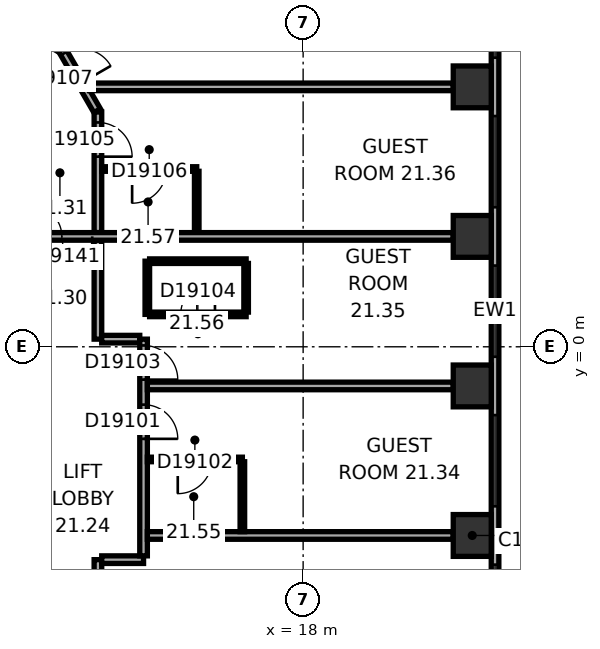
"""IFC4 building model, lengths in metres.
Left out: names, types, materials, properties, quantities, classifications, styles, units other than length and angle.
Written with IfcOpenShell. Run it as: python <this file> out.ifc"""

import sys

from ifc_helpers import new_model, si_unit, direction, frame, frame_2d, origin, origin_2d, place, context, subcontext, project, spatial, rectangle, extrude, element, fill, save


model = new_model("IFC4")
c1 = context("Model", 3, precision=1e-05, world=origin(), true_north=direction((0.0, 1.0)))
c2 = subcontext(c1, "Body", "Model", "MODEL_VIEW")
j1 = project(units=[si_unit("LENGTHUNIT", "METRE"), si_unit("PLANEANGLEUNIT", "RADIAN")], contexts=[c1])
p1 = place(None, origin())
s1 = spatial("IfcSite", under=j1, at=p1, CompositionType="ELEMENT")
p2 = place(p1, origin())
s2 = spatial("IfcBuilding", under=s1, at=p2, CompositionType="ELEMENT")
p3 = place(p2, frame((0.0, 0.0, 93.5)))
s3 = spatial("IfcBuildingStorey", under=s2, at=p3, CompositionType="ELEMENT", Elevation=93.5)
for number, where, z_axis, x_axis in (
    (1, (22.45, -4.965, 0.0), (0.0, 0.0, 1.0), (0.0, 1.0, 0.0)),
    (2, (22.45, -1.03, 0.0), (0.0, 0.0, 1.0), (0.0, 1.0, 0.0)),
    (3, (22.45, 2.905, 0.0), (0.0, 0.0, 1.0), (0.0, 1.0, 0.0)),
    (4, (22.45, 6.839, 0.0), (0.0, 0.0, 1.0), (0.0, 1.0, 0.0)),
):
    element("IfcColumn", number, at=place(p3, frame(where, z_axis=z_axis, x_axis=x_axis)), inside=s3, PredefinedType="COLUMN", context=c2, shape_type="SweptSolid", body=[
        extrude(rectangle(XDim=1.1, YDim=1.0, at=origin_2d()), origin(), (0.0, 0.0, 1.0), 3.3),
    ])
p4 = place(p3, frame((23.05, -9.687, 0.0), z_axis=(0.0, 0.0, 1.0), x_axis=(0.0, 1.0, 0.0)))
e5 = element("IfcWall", 5, at=p4, inside=s3, PredefinedType="STANDARD", context=c2, shape_type="SweptSolid", body=[
    extrude(rectangle(XDim=21.246, YDim=0.2, at=frame_2d((10.623, 0.0))), origin(), (0.0, 0.0, 1.0), 3.3),
])
p5 = place(p4, frame((1.555, 0.0, 0.8)))
e6 = element("IfcOpeningElement", 6, at=p5, cuts=e5, PredefinedType="OPENING", context=c2, shape_type="SweptSolid", body=[
    extrude(rectangle(XDim=2.4, YDim=1.7, at=frame_2d((1.2, 0.85))), frame((0.0, 0.11, 0.0), z_axis=(0.0, -1.0, 0.0), x_axis=(1.0, 0.0, 0.0)), (0.0, 0.0, 1.0), 0.22),
])
p6 = place(p4, frame((5.489, 0.0, 0.8)))
e7 = element("IfcOpeningElement", 7, at=p6, cuts=e5, PredefinedType="OPENING", context=c2, shape_type="SweptSolid", body=[
    extrude(rectangle(XDim=2.4, YDim=1.7, at=frame_2d((1.2, 0.85))), frame((0.0, 0.11, 0.0), z_axis=(0.0, -1.0, 0.0), x_axis=(1.0, 0.0, 0.0)), (0.0, 0.0, 1.0), 0.22),
])
p7 = place(p4, frame((9.424, 0.0, 0.8)))
e8 = element("IfcOpeningElement", 8, at=p7, cuts=e5, PredefinedType="OPENING", context=c2, shape_type="SweptSolid", body=[
    extrude(rectangle(XDim=2.4, YDim=1.7, at=frame_2d((1.2, 0.85))), frame((0.0, 0.11, 0.0), z_axis=(0.0, -1.0, 0.0), x_axis=(1.0, 0.0, 0.0)), (0.0, 0.0, 1.0), 0.22),
])
p8 = place(p4, frame((13.358, 0.0, 0.8)))
e9 = element("IfcOpeningElement", 9, at=p8, cuts=e5, PredefinedType="OPENING", context=c2, shape_type="SweptSolid", body=[
    extrude(rectangle(XDim=2.4, YDim=1.7, at=frame_2d((1.2, 0.85))), frame((0.0, 0.11, 0.0), z_axis=(0.0, -1.0, 0.0), x_axis=(1.0, 0.0, 0.0)), (0.0, 0.0, 1.0), 0.22),
])
p9 = place(p4, frame((17.293, 0.0, 0.8)))
e10 = element("IfcOpeningElement", 10, at=p9, cuts=e5, PredefinedType="OPENING", context=c2, shape_type="SweptSolid", body=[
    extrude(rectangle(XDim=2.4, YDim=1.7, at=frame_2d((1.2, 0.85))), frame((0.0, 0.11, 0.0), z_axis=(0.0, -1.0, 0.0), x_axis=(1.0, 0.0, 0.0)), (0.0, 0.0, 1.0), 0.22),
])
p10 = place(p3, frame((12.58, 6.212, 0.0), z_axis=(0.0, 0.0, 1.0), x_axis=(-0.500063286585, 0.865988862174, 0.0)))
e11 = element("IfcWall", 11, at=p10, inside=s3, PredefinedType="PARTITIONING", context=c2, shape_type="SweptSolid", body=[
    extrude(rectangle(XDim=1.86, YDim=0.2, at=frame_2d((0.93, 0.0))), origin(), (0.0, 0.0, 1.0), 3.05),
])
p11 = place(p10, frame((0.842, 0.0, 0.0)))
e12 = element("IfcOpeningElement", 12, at=p11, cuts=e11, PredefinedType="OPENING", context=c2, shape_type="SweptSolid", body=[
    extrude(rectangle(XDim=0.9, YDim=2.1, at=frame_2d((0.45, 1.05))), frame((0.0, 0.11, 0.0), z_axis=(0.0, -1.0, 0.0), x_axis=(1.0, 0.0, 0.0)), (0.0, 0.0, 1.0), 0.22),
])
p12 = place(p3, frame((12.6, -6.138, 0.0), z_axis=(0.0, 0.0, 1.0), x_axis=(0.0, 1.0, 0.0)))
e13 = element("IfcWall", 13, at=p12, inside=s3, PredefinedType="PARTITIONING", context=c2, shape_type="SweptSolid", body=[
    extrude(rectangle(XDim=0.537, YDim=0.2, at=frame_2d((0.268, 0.0))), origin(), (0.0, 0.0, 1.0), 3.05),
])
p13 = place(p3, frame((12.6, 0.201, 0.0), z_axis=(0.0, 0.0, 1.0), x_axis=(0.0, 1.0, 0.0)))
e14 = element("IfcWall", 14, at=p13, inside=s3, PredefinedType="PARTITIONING", context=c2, shape_type="SweptSolid", body=[
    extrude(rectangle(XDim=2.604, YDim=0.2, at=frame_2d((1.302, 0.0))), origin(), (0.0, 0.0, 1.0), 3.05),
])
p14 = place(p3, frame((12.6, 3.004, 0.0), z_axis=(0.0, 0.0, 1.0), x_axis=(0.0, 1.0, 0.0)))
e15 = element("IfcWall", 15, at=p14, inside=s3, PredefinedType="PARTITIONING", context=c2, shape_type="SweptSolid", body=[
    extrude(rectangle(XDim=3.173, YDim=0.2, at=frame_2d((1.586, 0.0))), origin(), (0.0, 0.0, 1.0), 3.05),
])
p15 = place(p14, frame((1.998, 0.0, 0.0)))
e16 = element("IfcOpeningElement", 16, at=p15, cuts=e15, PredefinedType="OPENING", context=c2, shape_type="SweptSolid", body=[
    extrude(rectangle(XDim=0.9, YDim=2.1, at=frame_2d((0.45, 1.05))), frame((0.0, 0.11, 0.0), z_axis=(0.0, -1.0, 0.0), x_axis=(1.0, 0.0, 0.0)), (0.0, 0.0, 1.0), 0.22),
])
p16 = place(p3, frame((12.7, -5.601, 0.0), z_axis=(0.0, 0.0, 1.0), x_axis=(1.0, 0.0, 0.0)))
e17 = element("IfcWall", 17, at=p16, inside=s3, PredefinedType="PARTITIONING", context=c2, shape_type="SweptSolid", body=[
    extrude(rectangle(XDim=1.101, YDim=0.2, at=frame_2d((0.551, 0.0))), origin(), (0.0, 0.0, 1.0), 3.05),
])
p17 = place(p3, frame((12.7, 4.677, 0.0), z_axis=(0.0, 0.0, 1.0), x_axis=(1.0, 0.0, 0.0)))
e18 = element("IfcWall", 18, at=p17, inside=s3, PredefinedType="PARTITIONING", context=c2, shape_type="SweptSolid", body=[
    extrude(rectangle(XDim=2.5, YDim=0.12, at=frame_2d((1.25, 0.0))), origin(), (0.0, 0.0, 1.0), 3.05),
])
p18 = place(p17, frame((0.8, 0.0, 0.0)))
e19 = element("IfcOpeningElement", 19, at=p18, cuts=e18, PredefinedType="OPENING", context=c2, shape_type="SweptSolid", body=[
    extrude(rectangle(XDim=0.9, YDim=2.1, at=frame_2d((0.45, 1.05))), frame((0.0, 0.07, 0.0), z_axis=(0.0, -1.0, 0.0), x_axis=(1.0, 0.0, 0.0)), (0.0, 0.0, 1.0), 0.14),
])
p19 = place(p3, frame((13.701, 0.201, 0.0), z_axis=(0.0, 0.0, 1.0), x_axis=(-1.0, 0.0, 0.0)))
e20 = element("IfcWall", 20, at=p19, inside=s3, PredefinedType="PARTITIONING", context=c2, shape_type="SweptSolid", body=[
    extrude(rectangle(XDim=1.001, YDim=0.2, at=frame_2d((0.5, 0.0))), origin(), (0.0, 0.0, 1.0), 3.05),
])
p20 = place(p3, frame((13.801, -5.501, 0.0), z_axis=(0.0, 0.0, 1.0), x_axis=(0.0, 1.0, 0.0)))
e21 = element("IfcWall", 21, at=p20, inside=s3, PredefinedType="PARTITIONING", context=c2, shape_type="SweptSolid", body=[
    extrude(rectangle(XDim=5.702, YDim=0.2, at=frame_2d((2.851, 0.0))), origin(), (0.0, 0.0, 1.0), 3.05),
])
p21 = place(p20, frame((3.079, 0.0, 0.0)))
e22 = element("IfcOpeningElement", 22, at=p21, cuts=e21, PredefinedType="OPENING", context=c2, shape_type="SweptSolid", body=[
    extrude(rectangle(XDim=0.9, YDim=2.1, at=frame_2d((0.45, 1.05))), frame((0.0, 0.11, 0.0), z_axis=(0.0, -1.0, 0.0), x_axis=(1.0, 0.0, 0.0)), (0.0, 0.0, 1.0), 0.22),
])
p22 = place(p20, frame((4.636, 0.0, 0.0)))
e23 = element("IfcOpeningElement", 23, at=p22, cuts=e21, PredefinedType="OPENING", context=c2, shape_type="SweptSolid", body=[
    extrude(rectangle(XDim=0.9, YDim=2.1, at=frame_2d((0.45, 1.05))), frame((0.0, 0.11, 0.0), z_axis=(0.0, -1.0, 0.0), x_axis=(1.0, 0.0, 0.0)), (0.0, 0.0, 1.0), 0.22),
])
p23 = place(p3, frame((13.901, -4.965, 0.0), z_axis=(0.0, 0.0, 1.0), x_axis=(1.0, 0.0, 0.0)))
e24 = element("IfcWall", 24, at=p23, inside=s3, PredefinedType="PARTITIONING", context=c2, shape_type="SweptSolid", body=[
    extrude(rectangle(XDim=8.049, YDim=0.2, at=frame_2d((4.024, 0.0))), origin(), (0.0, 0.0, 1.0), 3.05),
])
p24 = place(p3, frame((13.901, -2.965, 0.0), z_axis=(0.0, 0.0, 1.0), x_axis=(1.0, 0.0, 0.0)))
e25 = element("IfcWall", 25, at=p24, inside=s3, PredefinedType="PARTITIONING", context=c2, shape_type="SweptSolid", body=[
    extrude(rectangle(XDim=2.5, YDim=0.12, at=frame_2d((1.25, 0.0))), origin(), (0.0, 0.0, 1.0), 3.05),
])
p25 = place(p24, frame((0.8, 0.0, 0.0)))
e26 = element("IfcOpeningElement", 26, at=p25, cuts=e25, PredefinedType="OPENING", context=c2, shape_type="SweptSolid", body=[
    extrude(rectangle(XDim=0.9, YDim=2.1, at=frame_2d((0.45, 1.05))), frame((0.0, 0.07, 0.0), z_axis=(0.0, -1.0, 0.0), x_axis=(1.0, 0.0, 0.0)), (0.0, 0.0, 1.0), 0.14),
])
p26 = place(p3, frame((13.9, 0.853, 0.0), z_axis=(0.0, 0.0, 1.0), x_axis=(0.0, 1.0, 0.0)))
e27 = element("IfcWall", 27, at=p26, inside=s3, PredefinedType="PARTITIONING", context=c2, shape_type="SweptSolid", body=[
    extrude(rectangle(XDim=1.4, YDim=0.12, at=frame_2d((0.7, 0.0))), origin(), (0.0, 0.0, 1.0), 3.05),
])
p27 = place(p3, frame((13.96, 2.253, 0.0), z_axis=(0.0, 0.0, 1.0), x_axis=(1.0, 0.0, 0.0)))
e28 = element("IfcWall", 28, at=p27, inside=s3, PredefinedType="PARTITIONING", context=c2, shape_type="SweptSolid", body=[
    extrude(rectangle(XDim=2.54, YDim=0.12, at=frame_2d((1.27, 0.0))), origin(), (0.0, 0.0, 1.0), 3.05),
])
p28 = place(p3, frame((15.2, 4.618, 0.0), z_axis=(0.0, 0.0, 1.0), x_axis=(0.0, -1.0, 0.0)))
e29 = element("IfcWall", 29, at=p28, inside=s3, PredefinedType="PARTITIONING", context=c2, shape_type="SweptSolid", body=[
    extrude(rectangle(XDim=1.613, YDim=0.12, at=frame_2d((0.807, 0.0))), origin(), (0.0, 0.0, 1.0), 3.05),
])
p29 = place(p3, frame((16.401, -3.025, 0.0), z_axis=(0.0, 0.0, 1.0), x_axis=(0.0, -1.0, 0.0)))
e30 = element("IfcWall", 30, at=p29, inside=s3, PredefinedType="PARTITIONING", context=c2, shape_type="SweptSolid", body=[
    extrude(rectangle(XDim=1.84, YDim=0.12, at=frame_2d((0.92, 0.0))), origin(), (0.0, 0.0, 1.0), 3.05),
])
p30 = place(p3, frame((16.5, 0.853, 0.0), z_axis=(0.0, 0.0, 1.0), x_axis=(-1.0, 0.0, 0.0)))
e31 = element("IfcWall", 31, at=p30, inside=s3, PredefinedType="PARTITIONING", context=c2, shape_type="SweptSolid", body=[
    extrude(rectangle(XDim=2.54, YDim=0.12, at=frame_2d((1.27, 0.0))), origin(), (0.0, 0.0, 1.0), 3.05),
])
p31 = place(p30, frame((0.82, 0.0, 0.0)))
e32 = element("IfcOpeningElement", 32, at=p31, cuts=e31, PredefinedType="OPENING", context=c2, shape_type="SweptSolid", body=[
    extrude(rectangle(XDim=0.9, YDim=2.1, at=frame_2d((0.45, 1.05))), frame((0.0, 0.07, 0.0), z_axis=(0.0, -1.0, 0.0), x_axis=(1.0, 0.0, 0.0)), (0.0, 0.0, 1.0), 0.14),
])
p32 = place(p3, frame((16.5, 2.193, 0.0), z_axis=(0.0, 0.0, 1.0), x_axis=(0.0, -1.0, 0.0)))
e33 = element("IfcWall", 33, at=p32, inside=s3, PredefinedType="PARTITIONING", context=c2, shape_type="SweptSolid", body=[
    extrude(rectangle(XDim=1.28, YDim=0.12, at=frame_2d((0.64, 0.0))), origin(), (0.0, 0.0, 1.0), 3.05),
])
p33 = place(p3, frame((21.95, -1.03, 0.0), z_axis=(0.0, 0.0, 1.0), x_axis=(-1.0, 0.0, 0.0)))
e34 = element("IfcWall", 34, at=p33, inside=s3, PredefinedType="PARTITIONING", context=c2, shape_type="SweptSolid", body=[
    extrude(rectangle(XDim=8.049, YDim=0.2, at=frame_2d((4.024, 0.0))), origin(), (0.0, 0.0, 1.0), 2.6),
])
p34 = place(p3, frame((21.95, 2.905, 0.0), z_axis=(0.0, 0.0, 1.0), x_axis=(-1.0, 0.0, 0.0)))
e35 = element("IfcWall", 35, at=p34, inside=s3, PredefinedType="PARTITIONING", context=c2, shape_type="SweptSolid", body=[
    extrude(rectangle(XDim=11.25, YDim=0.2, at=frame_2d((5.625, 0.0))), origin(), (0.0, 0.0, 1.0), 3.05),
])
p35 = place(p34, frame((9.5, 0.0, 0.0)))
e36 = element("IfcOpeningElement", 36, at=p35, cuts=e35, PredefinedType="OPENING", context=c2, shape_type="SweptSolid", body=[
    extrude(rectangle(XDim=1.6, YDim=2.1, at=frame_2d((0.8, 1.05))), frame((0.0, 0.11, 0.0), z_axis=(0.0, -1.0, 0.0), x_axis=(1.0, 0.0, 0.0)), (0.0, 0.0, 1.0), 0.22),
])
p36 = place(p3, frame((21.95, 6.839, 0.0), z_axis=(0.0, 0.0, 1.0), x_axis=(-1.0, 0.0, 0.0)))
e37 = element("IfcWall", 37, at=p36, inside=s3, PredefinedType="PARTITIONING", context=c2, shape_type="SweptSolid", body=[
    extrude(rectangle(XDim=9.572, YDim=0.2, at=frame_2d((4.786, 0.0))), origin(), (0.0, 0.0, 1.0), 3.05),
])
p37 = place(p5, origin())
e38 = element("IfcWindow", 38, at=p37, inside=s3, PartitioningType="SINGLE_PANEL", PredefinedType="WINDOW", context=c2, shape_type="SweptSolid", body=[
    extrude(rectangle(XDim=2.4, YDim=1.7, at=frame_2d((1.2, 0.85))), frame((0.0, 0.03, 0.0), z_axis=(0.0, -1.0, 0.0), x_axis=(1.0, 0.0, 0.0)), (0.0, 0.0, 1.0), 0.06),
])
fill(e6, e38)
p38 = place(p6, origin())
e39 = element("IfcWindow", 39, at=p38, inside=s3, PartitioningType="SINGLE_PANEL", PredefinedType="WINDOW", context=c2, shape_type="SweptSolid", body=[
    extrude(rectangle(XDim=2.4, YDim=1.7, at=frame_2d((1.2, 0.85))), frame((0.0, 0.03, 0.0), z_axis=(0.0, -1.0, 0.0), x_axis=(1.0, 0.0, 0.0)), (0.0, 0.0, 1.0), 0.06),
])
fill(e7, e39)
p39 = place(p7, origin())
e40 = element("IfcWindow", 40, at=p39, inside=s3, PartitioningType="SINGLE_PANEL", PredefinedType="WINDOW", context=c2, shape_type="SweptSolid", body=[
    extrude(rectangle(XDim=2.4, YDim=1.7, at=frame_2d((1.2, 0.85))), frame((0.0, 0.03, 0.0), z_axis=(0.0, -1.0, 0.0), x_axis=(1.0, 0.0, 0.0)), (0.0, 0.0, 1.0), 0.06),
])
fill(e8, e40)
p40 = place(p8, origin())
e41 = element("IfcWindow", 41, at=p40, inside=s3, PartitioningType="SINGLE_PANEL", PredefinedType="WINDOW", context=c2, shape_type="SweptSolid", body=[
    extrude(rectangle(XDim=2.4, YDim=1.7, at=frame_2d((1.2, 0.85))), frame((0.0, 0.03, 0.0), z_axis=(0.0, -1.0, 0.0), x_axis=(1.0, 0.0, 0.0)), (0.0, 0.0, 1.0), 0.06),
])
fill(e9, e41)
p41 = place(p9, origin())
e42 = element("IfcWindow", 42, at=p41, inside=s3, PartitioningType="SINGLE_PANEL", PredefinedType="WINDOW", context=c2, shape_type="SweptSolid", body=[
    extrude(rectangle(XDim=2.4, YDim=1.7, at=frame_2d((1.2, 0.85))), frame((0.0, 0.03, 0.0), z_axis=(0.0, -1.0, 0.0), x_axis=(1.0, 0.0, 0.0)), (0.0, 0.0, 1.0), 0.06),
])
fill(e10, e42)
p42 = place(p21, origin())
e43 = element("IfcDoor", 43, at=p42, inside=s3, OperationType="SINGLE_SWING_LEFT", PredefinedType="DOOR", context=c2, shape_type="SweptSolid", body=[
    extrude(rectangle(XDim=0.9, YDim=2.1, at=frame_2d((0.45, 1.05))), frame((0.0, 0.025, 0.0), z_axis=(0.0, -1.0, 0.0), x_axis=(1.0, 0.0, 0.0)), (0.0, 0.0, 1.0), 0.05),
])
fill(e22, e43)
p43 = place(p25, origin())
e44 = element("IfcDoor", 44, at=p43, inside=s3, OperationType="SINGLE_SWING_LEFT", PredefinedType="DOOR", context=c2, shape_type="SweptSolid", body=[
    extrude(rectangle(XDim=0.9, YDim=2.1, at=frame_2d((0.45, 1.05))), frame((0.0, 0.025, 0.0), z_axis=(0.0, -1.0, 0.0), x_axis=(1.0, 0.0, 0.0)), (0.0, 0.0, 1.0), 0.05),
])
fill(e26, e44)
p44 = place(p22, origin())
e45 = element("IfcDoor", 45, at=p44, inside=s3, OperationType="SINGLE_SWING_LEFT", PredefinedType="DOOR", context=c2, shape_type="SweptSolid", body=[
    extrude(rectangle(XDim=0.9, YDim=2.1, at=frame_2d((0.45, 1.05))), frame((0.0, 0.025, 0.0), z_axis=(0.0, -1.0, 0.0), x_axis=(1.0, 0.0, 0.0)), (0.0, 0.0, 1.0), 0.05),
])
fill(e23, e45)
p45 = place(p31, origin())
e46 = element("IfcDoor", 46, at=p45, inside=s3, OperationType="SINGLE_SWING_LEFT", PredefinedType="DOOR", context=c2, shape_type="SweptSolid", body=[
    extrude(rectangle(XDim=0.9, YDim=2.1, at=frame_2d((0.45, 1.05))), frame((0.0, 0.025, 0.0), z_axis=(0.0, -1.0, 0.0), x_axis=(1.0, 0.0, 0.0)), (0.0, 0.0, 1.0), 0.05),
])
fill(e32, e46)
p46 = place(p15, origin())
e47 = element("IfcDoor", 47, at=p46, inside=s3, OperationType="SINGLE_SWING_LEFT", PredefinedType="DOOR", context=c2, shape_type="SweptSolid", body=[
    extrude(rectangle(XDim=0.9, YDim=2.1, at=frame_2d((0.45, 1.05))), frame((0.0, 0.025, 0.0), z_axis=(0.0, -1.0, 0.0), x_axis=(1.0, 0.0, 0.0)), (0.0, 0.0, 1.0), 0.05),
])
fill(e16, e47)
p47 = place(p18, origin())
e48 = element("IfcDoor", 48, at=p47, inside=s3, OperationType="SINGLE_SWING_LEFT", PredefinedType="DOOR", context=c2, shape_type="SweptSolid", body=[
    extrude(rectangle(XDim=0.9, YDim=2.1, at=frame_2d((0.45, 1.05))), frame((0.0, 0.025, 0.0), z_axis=(0.0, -1.0, 0.0), x_axis=(1.0, 0.0, 0.0)), (0.0, 0.0, 1.0), 0.05),
])
fill(e19, e48)
p48 = place(p11, origin())
e49 = element("IfcDoor", 49, at=p48, inside=s3, OperationType="SINGLE_SWING_LEFT", PredefinedType="DOOR", context=c2, shape_type="SweptSolid", body=[
    extrude(rectangle(XDim=0.9, YDim=2.1, at=frame_2d((0.45, 1.05))), frame((0.0, 0.025, 0.0), z_axis=(0.0, -1.0, 0.0), x_axis=(1.0, 0.0, 0.0)), (0.0, 0.0, 1.0), 0.05),
])
fill(e12, e49)
p49 = place(p35, origin())
e50 = element("IfcDoor", 50, at=p49, inside=s3, OperationType="DOUBLE_DOOR_SINGLE_SWING", PredefinedType="DOOR", context=c2, shape_type="SweptSolid", body=[
    extrude(rectangle(XDim=1.6, YDim=2.1, at=frame_2d((0.8, 1.05))), frame((0.0, 0.025, 0.0), z_axis=(0.0, -1.0, 0.0), x_axis=(1.0, 0.0, 0.0)), (0.0, 0.0, 1.0), 0.05),
])
fill(e36, e50)
save(model, sys.argv[1])
